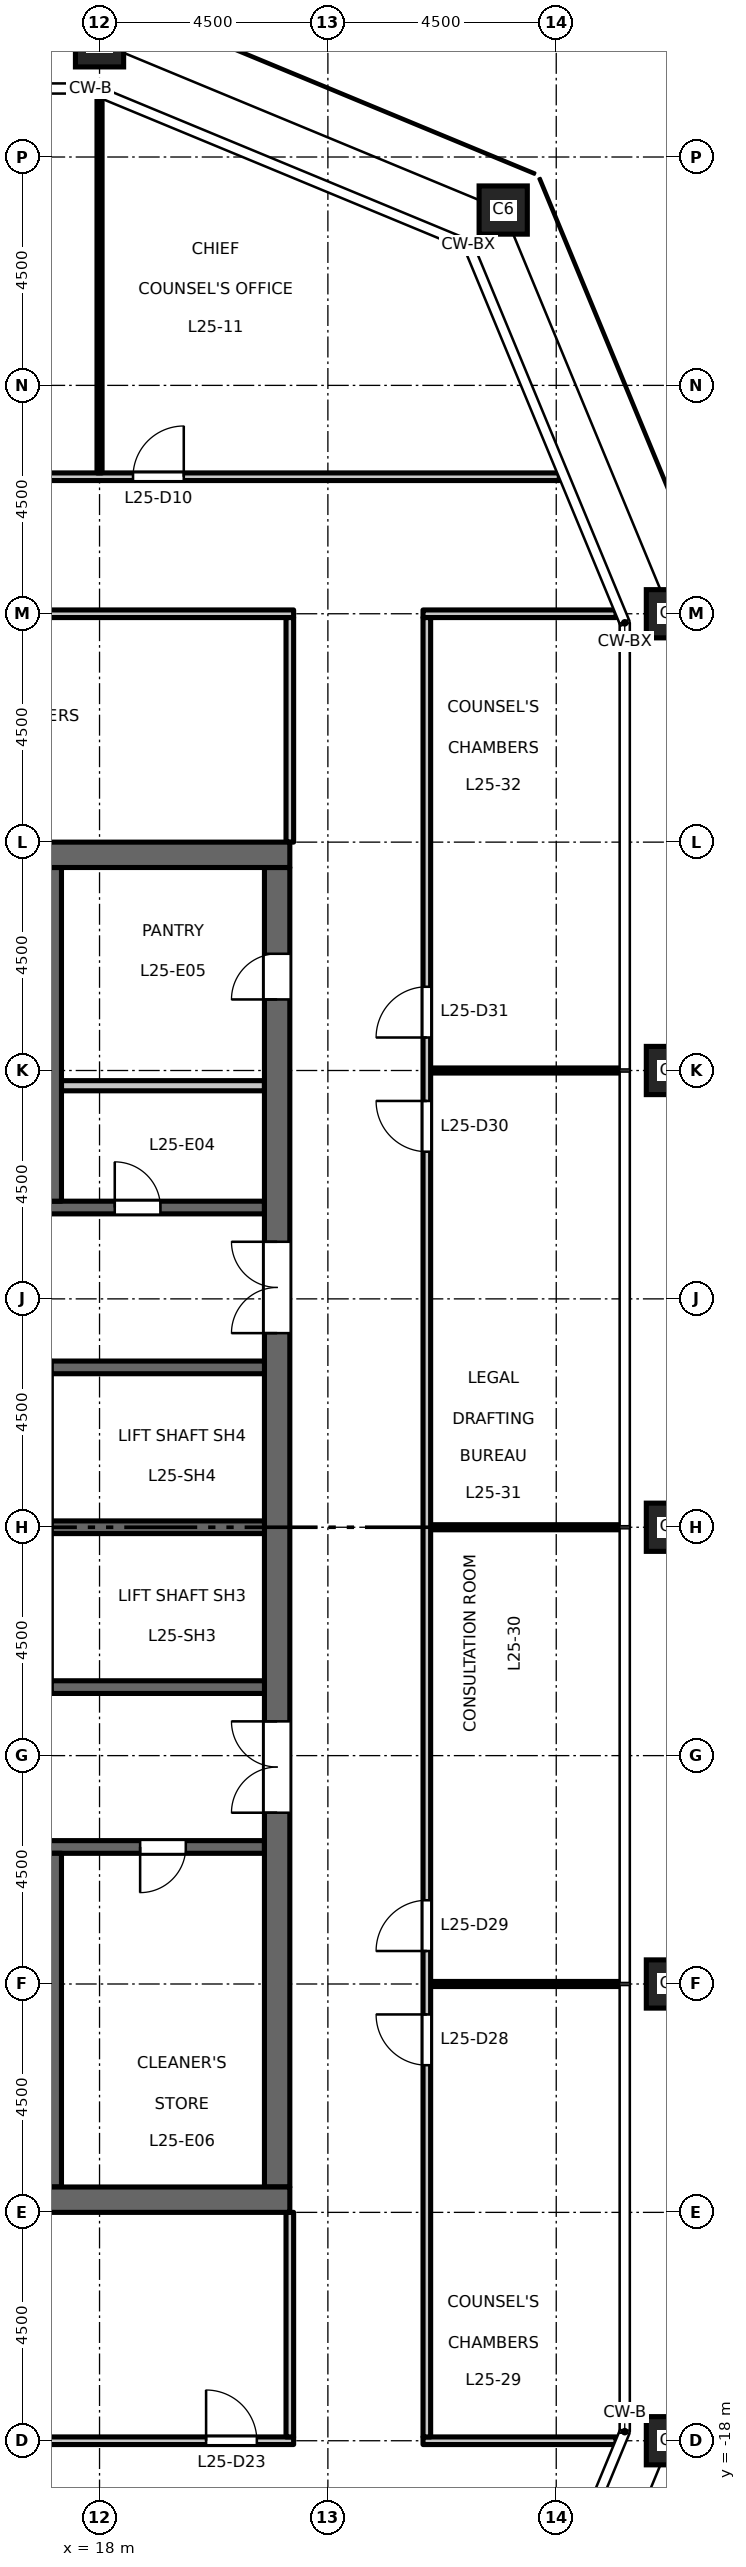
"""IFC4 building model, lengths in metres.
Left out: names, types, materials, properties, quantities, classifications, styles, units other than length and angle.
Written with IfcOpenShell. Run it as: python <this file> out.ifc"""

import sys

from ifc_helpers import new_model, si_unit, direction, frame, frame_2d, origin, origin_2d, place, context, subcontext, project, spatial, rectangle, hollow_rectangle, extrude, element, fill, save


model = new_model("IFC4")
c1 = context("Model", 3, precision=1e-05, world=origin(), true_north=direction((0.0, 1.0)))
c2 = subcontext(c1, "Body", "Model", "MODEL_VIEW")
j1 = project(units=[si_unit("LENGTHUNIT", "METRE"), si_unit("PLANEANGLEUNIT", "RADIAN")], contexts=[c1])
p1 = place(None, origin())
s1 = spatial("IfcSite", under=j1, at=p1, CompositionType="ELEMENT")
p2 = place(p1, origin())
s2 = spatial("IfcBuilding", under=s1, at=p2, CompositionType="ELEMENT")
p3 = place(p2, frame((0.0, 0.0, 118.2)))
s3 = spatial("IfcBuildingStorey", under=s2, at=p3, CompositionType="ELEMENT", Elevation=118.2)
for number, where, z_axis, x_axis in (
    (1, (29.25, -18.0, 0.0), (0.0, 0.0, 1.0), (1.0, 0.0, 0.0)),
    (2, (29.25, -9.0, 0.0), (0.0, 0.0, 1.0), (1.0, 0.0, 0.0)),
    (3, (29.25, 0.0, 0.0), (0.0, 0.0, 1.0), (1.0, 0.0, 0.0)),
    (4, (29.25, 9.0, 0.0), (0.0, 0.0, 1.0), (1.0, 0.0, 0.0)),
    (5, (29.25, 18.0, 0.0), (0.0, 0.0, 1.0), (1.0, 0.0, 0.0)),
    (6, (25.955, 25.955, 0.0), (0.0, 0.0, 1.0), (1.0, 0.0, 0.0)),
    (7, (18.0, 29.25, 0.0), (0.0, 0.0, 1.0), (1.0, 0.0, 0.0)),
):
    element("IfcColumn", number, at=place(p3, frame(where, z_axis=z_axis, x_axis=x_axis)), inside=s3, PredefinedType="COLUMN", context=c2, shape_type="SweptSolid", body=[
        extrude(hollow_rectangle(XDim=0.95, YDim=0.95, WallThickness=0.055, at=origin_2d()), origin(), (0.0, 0.0, 1.0), 4.5),
    ])
p4 = place(p3, frame((17.0, 6.3, 0.0), z_axis=(0.0, 0.0, 1.0), x_axis=(1.0, 0.0, 0.0)))
e8 = element("IfcWall", 8, at=p4, inside=s3, PredefinedType="SHEAR", context=c2, shape_type="SweptSolid", body=[
    extrude(rectangle(XDim=4.25, YDim=0.25, at=frame_2d((2.125, 0.0))), origin(), (0.0, 0.0, 1.0), 4.35),
])
p5 = place(p4, frame((1.3, 0.0, 0.0)))
e9 = element("IfcOpeningElement", 9, at=p5, cuts=e8, PredefinedType="OPENING", context=c2, shape_type="SweptSolid", body=[
    extrude(rectangle(XDim=0.9, YDim=2.1, at=frame_2d((0.45, 1.05))), frame((0.0, 0.135, 0.0), z_axis=(0.0, -1.0, 0.0), x_axis=(1.0, 0.0, 0.0)), (0.0, 0.0, 1.0), 0.27),
])
p6 = place(p3, frame((12.15, -6.3, 0.0), z_axis=(0.0, 0.0, 1.0), x_axis=(1.0, 0.0, 0.0)))
e10 = element("IfcWall", 10, at=p6, inside=s3, PredefinedType="SHEAR", context=c2, shape_type="SweptSolid", body=[
    extrude(rectangle(XDim=9.1, YDim=0.25, at=frame_2d((4.55, 0.0))), origin(), (0.0, 0.0, 1.0), 4.35),
])
p7 = place(p6, frame((1.8, 0.0, 0.0)))
e11 = element("IfcOpeningElement", 11, at=p7, cuts=e10, PredefinedType="OPENING", context=c2, shape_type="SweptSolid", body=[
    extrude(rectangle(XDim=1.0, YDim=2.1, at=frame_2d((0.5, 1.05))), frame((0.0, 0.135, 0.0), z_axis=(0.0, -1.0, 0.0), x_axis=(1.0, 0.0, 0.0)), (0.0, 0.0, 1.0), 0.27),
])
p8 = place(p6, frame((6.65, 0.0, 0.0)))
e12 = element("IfcOpeningElement", 12, at=p8, cuts=e10, PredefinedType="OPENING", context=c2, shape_type="SweptSolid", body=[
    extrude(rectangle(XDim=0.9, YDim=2.1, at=frame_2d((0.45, 1.05))), frame((0.0, 0.135, 0.0), z_axis=(0.0, -1.0, 0.0), x_axis=(1.0, 0.0, 0.0)), (0.0, 0.0, 1.0), 0.27),
])
p9 = place(p3, frame((21.5, -13.0, 0.0), z_axis=(0.0, 0.0, 1.0), x_axis=(0.0, 1.0, 0.0)))
e13 = element("IfcWall", 13, at=p9, inside=s3, PredefinedType="SHEAR", context=c2, shape_type="SweptSolid", body=[
    extrude(rectangle(XDim=26.0, YDim=0.5, at=frame_2d((13.0, 0.0))), origin(), (0.0, 0.0, 1.0), 4.35),
])
p10 = place(p9, frame((16.825, 0.0, 0.0)))
e14 = element("IfcOpeningElement", 14, at=p10, cuts=e13, PredefinedType="OPENING", context=c2, shape_type="SweptSolid", body=[
    extrude(rectangle(XDim=1.8, YDim=2.1, at=frame_2d((0.9, 1.05))), frame((0.0, 0.26, 0.0), z_axis=(0.0, -1.0, 0.0), x_axis=(1.0, 0.0, 0.0)), (0.0, 0.0, 1.0), 0.52),
])
p11 = place(p9, frame((7.375, 0.0, 0.0)))
e15 = element("IfcOpeningElement", 15, at=p11, cuts=e13, PredefinedType="OPENING", context=c2, shape_type="SweptSolid", body=[
    extrude(rectangle(XDim=1.8, YDim=2.1, at=frame_2d((0.9, 1.05))), frame((0.0, 0.26, 0.0), z_axis=(0.0, -1.0, 0.0), x_axis=(1.0, 0.0, 0.0)), (0.0, 0.0, 1.0), 0.52),
])
p12 = place(p9, frame((23.4, 0.0, 0.0)))
e16 = element("IfcOpeningElement", 16, at=p12, cuts=e13, PredefinedType="OPENING", context=c2, shape_type="SweptSolid", body=[
    extrude(rectangle(XDim=0.9, YDim=2.1, at=frame_2d((0.45, 1.05))), frame((0.0, 0.26, 0.0), z_axis=(0.0, -1.0, 0.0), x_axis=(1.0, 0.0, 0.0)), (0.0, 0.0, 1.0), 0.52),
])
p13 = place(p3, frame((17.25, 8.7, 0.0), z_axis=(0.0, 0.0, 1.0), x_axis=(1.0, 0.0, 0.0)))
e17 = element("IfcWall", 17, at=p13, inside=s3, PredefinedType="PARTITIONING", context=c2, shape_type="SweptSolid", body=[
    extrude(rectangle(XDim=4.0, YDim=0.2, at=frame_2d((2.0, 0.0))), origin(), (0.0, 0.0, 1.0), 4.35),
])
for number, where, z_axis, x_axis in (
    (18, (17.05, 0.0, 0.0), (0.0, 0.0, 1.0), (1.0, 0.0, 0.0)),
    (19, (17.05, 3.15, 0.0), (0.0, 0.0, 1.0), (1.0, 0.0, 0.0)),
    (20, (17.05, -3.15, 0.0), (0.0, 0.0, 1.0), (1.0, 0.0, 0.0)),
):
    element("IfcWall", number, at=place(p3, frame(where, z_axis=z_axis, x_axis=x_axis)), inside=s3, PredefinedType="SHEAR", context=c2, shape_type="SweptSolid", body=[
        extrude(rectangle(XDim=4.2, YDim=0.25, at=frame_2d((2.1, 0.0))), origin(), (0.0, 0.0, 1.0), 4.35),
    ])
for number, where, z_axis, x_axis in (
    (21, (17.0, 6.425, 0.0), (0.0, 0.0, 1.0), (0.0, 1.0, 0.0)),
    (22, (17.0, -13.0, 0.0), (0.0, 0.0, 1.0), (0.0, 1.0, 0.0)),
):
    element("IfcWall", number, at=place(p3, frame(where, z_axis=z_axis, x_axis=x_axis)), inside=s3, PredefinedType="SHEAR", context=c2, shape_type="SweptSolid", body=[
        extrude(rectangle(XDim=6.575, YDim=0.5, at=frame_2d((3.288, 0.0))), origin(), (0.0, 0.0, 1.0), 4.35),
    ])
for number, where, z_axis, x_axis in (
    (23, (8.25, 13.25, 0.0), (0.0, 0.0, 1.0), (1.0, 0.0, 0.0)),
    (24, (8.25, -13.25, 0.0), (0.0, 0.0, 1.0), (1.0, 0.0, 0.0)),
):
    element("IfcWall", number, at=place(p3, frame(where, z_axis=z_axis, x_axis=x_axis)), inside=s3, PredefinedType="SHEAR", context=c2, shape_type="SweptSolid", body=[
        extrude(rectangle(XDim=13.5, YDim=0.5, at=frame_2d((6.75, 0.0))), origin(), (0.0, 0.0, 1.0), 4.35),
    ])
p14 = place(p3, frame((-21.825, -18.0, 0.0), z_axis=(0.0, 0.0, 1.0), x_axis=(1.0, 0.0, 0.0)))
e25 = element("IfcWall", 25, at=p14, inside=s3, PredefinedType="PARTITIONING", context=c2, shape_type="SweptSolid", body=[
    extrude(rectangle(XDim=43.65, YDim=0.15, at=frame_2d((21.825, 0.0))), origin(), (0.0, 0.0, 1.0), 4.35),
])
p15 = place(p14, frame((14.175, 0.0, 0.0)))
e26 = element("IfcOpeningElement", 26, at=p15, cuts=e25, PredefinedType="OPENING", context=c2, shape_type="SweptSolid", body=[
    extrude(rectangle(XDim=1.0, YDim=2.1, at=frame_2d((0.5, 1.05))), frame((0.0, 0.085, 0.0), z_axis=(0.0, -1.0, 0.0), x_axis=(1.0, 0.0, 0.0)), (0.0, 0.0, 1.0), 0.17),
])
p16 = place(p14, frame((28.425, 0.0, 0.0)))
e27 = element("IfcOpeningElement", 27, at=p16, cuts=e25, PredefinedType="OPENING", context=c2, shape_type="SweptSolid", body=[
    extrude(rectangle(XDim=1.0, YDim=2.1, at=frame_2d((0.5, 1.05))), frame((0.0, 0.085, 0.0), z_axis=(0.0, -1.0, 0.0), x_axis=(1.0, 0.0, 0.0)), (0.0, 0.0, 1.0), 0.17),
])
p17 = place(p14, frame((0.675, 0.0, 0.0)))
e28 = element("IfcOpeningElement", 28, at=p17, cuts=e25, PredefinedType="OPENING", context=c2, shape_type="SweptSolid", body=[
    extrude(rectangle(XDim=1.0, YDim=2.1, at=frame_2d((0.5, 1.05))), frame((0.0, 0.085, 0.0), z_axis=(0.0, -1.0, 0.0), x_axis=(1.0, 0.0, 0.0)), (0.0, 0.0, 1.0), 0.17),
])
p18 = place(p14, frame((41.925, 0.0, 0.0)))
e29 = element("IfcOpeningElement", 29, at=p18, cuts=e25, PredefinedType="OPENING", context=c2, shape_type="SweptSolid", body=[
    extrude(rectangle(XDim=1.0, YDim=2.1, at=frame_2d((0.5, 1.05))), frame((0.0, 0.085, 0.0), z_axis=(0.0, -1.0, 0.0), x_axis=(1.0, 0.0, 0.0)), (0.0, 0.0, 1.0), 0.17),
])
p19 = place(p3, frame((24.375, -18.0, 0.0), z_axis=(0.0, 0.0, 1.0), x_axis=(1.0, 0.0, 0.0)))
e30 = element("IfcWall", 30, at=p19, inside=s3, PredefinedType="PARTITIONING", context=c2, shape_type="SweptSolid", body=[
    extrude(rectangle(XDim=3.803, YDim=0.15, at=frame_2d((1.901, 0.0))), origin(), (0.0, 0.0, 1.0), 4.35),
])
for number, where, z_axis, x_axis in (
    (31, (24.525, -9.0, 0.0), (0.0, 0.0, 1.0), (1.0, 0.0, 0.0)),
    (32, (24.525, 0.0, 0.0), (0.0, 0.0, 1.0), (1.0, 0.0, 0.0)),
    (33, (24.525, 9.0, 0.0), (0.0, 0.0, 1.0), (1.0, 0.0, 0.0)),
):
    element("IfcWall", number, at=place(p3, frame(where, z_axis=z_axis, x_axis=x_axis)), inside=s3, PredefinedType="PARTITIONING", context=c2, shape_type="SweptSolid", body=[
        extrude(rectangle(XDim=3.735, YDim=0.1, at=frame_2d((1.868, 0.0))), origin(), (0.0, 0.0, 1.0), 4.35),
    ])
p20 = place(p3, frame((-21.825, 18.0, 0.0), z_axis=(0.0, 0.0, 1.0), x_axis=(1.0, 0.0, 0.0)))
e34 = element("IfcWall", 34, at=p20, inside=s3, PredefinedType="PARTITIONING", context=c2, shape_type="SweptSolid", body=[
    extrude(rectangle(XDim=43.65, YDim=0.15, at=frame_2d((21.825, 0.0))), origin(), (0.0, 0.0, 1.0), 4.35),
])
p21 = place(p20, frame((14.225, 0.0, 0.0)))
e35 = element("IfcOpeningElement", 35, at=p21, cuts=e34, PredefinedType="OPENING", context=c2, shape_type="SweptSolid", body=[
    extrude(rectangle(XDim=1.0, YDim=2.1, at=frame_2d((0.5, 1.05))), frame((0.0, 0.085, 0.0), z_axis=(0.0, -1.0, 0.0), x_axis=(1.0, 0.0, 0.0)), (0.0, 0.0, 1.0), 0.17),
])
p22 = place(p20, frame((11.975, 0.0, 0.0)))
e36 = element("IfcOpeningElement", 36, at=p22, cuts=e34, PredefinedType="OPENING", context=c2, shape_type="SweptSolid", body=[
    extrude(rectangle(XDim=1.0, YDim=2.1, at=frame_2d((0.5, 1.05))), frame((0.0, 0.085, 0.0), z_axis=(0.0, -1.0, 0.0), x_axis=(1.0, 0.0, 0.0)), (0.0, 0.0, 1.0), 0.17),
])
p23 = place(p20, frame((30.725, 0.0, 0.0)))
e37 = element("IfcOpeningElement", 37, at=p23, cuts=e34, PredefinedType="OPENING", context=c2, shape_type="SweptSolid", body=[
    extrude(rectangle(XDim=1.0, YDim=2.1, at=frame_2d((0.5, 1.05))), frame((0.0, 0.085, 0.0), z_axis=(0.0, -1.0, 0.0), x_axis=(1.0, 0.0, 0.0)), (0.0, 0.0, 1.0), 0.17),
])
p24 = place(p3, frame((24.375, 18.0, 0.0), z_axis=(0.0, 0.0, 1.0), x_axis=(1.0, 0.0, 0.0)))
e38 = element("IfcWall", 38, at=p24, inside=s3, PredefinedType="PARTITIONING", context=c2, shape_type="SweptSolid", body=[
    extrude(rectangle(XDim=3.803, YDim=0.15, at=frame_2d((1.901, 0.0))), origin(), (0.0, 0.0, 1.0), 4.35),
])
p25 = place(p3, frame((-27.06, 20.7, 0.0), z_axis=(0.0, 0.0, 1.0), x_axis=(1.0, 0.0, 0.0)))
e39 = element("IfcWall", 39, at=p25, inside=s3, PredefinedType="PARTITIONING", context=c2, shape_type="SweptSolid", body=[
    extrude(rectangle(XDim=54.12, YDim=0.15, at=frame_2d((27.06, 0.0))), origin(), (0.0, 0.0, 1.0), 4.35),
])
p26 = place(p25, frame((16.41, 0.0, 0.0)))
e40 = element("IfcOpeningElement", 40, at=p26, cuts=e39, PredefinedType="OPENING", context=c2, shape_type="SweptSolid", body=[
    extrude(rectangle(XDim=1.0, YDim=2.1, at=frame_2d((0.5, 1.05))), frame((0.0, 0.085, 0.0), z_axis=(0.0, -1.0, 0.0), x_axis=(1.0, 0.0, 0.0)), (0.0, 0.0, 1.0), 0.17),
])
p27 = place(p25, frame((18.66, 0.0, 0.0)))
e41 = element("IfcOpeningElement", 41, at=p27, cuts=e39, PredefinedType="OPENING", context=c2, shape_type="SweptSolid", body=[
    extrude(rectangle(XDim=1.0, YDim=2.1, at=frame_2d((0.5, 1.05))), frame((0.0, 0.085, 0.0), z_axis=(0.0, -1.0, 0.0), x_axis=(1.0, 0.0, 0.0)), (0.0, 0.0, 1.0), 0.17),
])
p28 = place(p25, frame((34.41, 0.0, 0.0)))
e42 = element("IfcOpeningElement", 42, at=p28, cuts=e39, PredefinedType="OPENING", context=c2, shape_type="SweptSolid", body=[
    extrude(rectangle(XDim=1.0, YDim=2.1, at=frame_2d((0.5, 1.05))), frame((0.0, 0.085, 0.0), z_axis=(0.0, -1.0, 0.0), x_axis=(1.0, 0.0, 0.0)), (0.0, 0.0, 1.0), 0.17),
])
p29 = place(p25, frame((36.66, 0.0, 0.0)))
e43 = element("IfcOpeningElement", 43, at=p29, cuts=e39, PredefinedType="OPENING", context=c2, shape_type="SweptSolid", body=[
    extrude(rectangle(XDim=1.0, YDim=2.1, at=frame_2d((0.5, 1.05))), frame((0.0, 0.085, 0.0), z_axis=(0.0, -1.0, 0.0), x_axis=(1.0, 0.0, 0.0)), (0.0, 0.0, 1.0), 0.17),
])
p30 = place(p25, frame((7.41, 0.0, 0.0)))
e44 = element("IfcOpeningElement", 44, at=p30, cuts=e39, PredefinedType="OPENING", context=c2, shape_type="SweptSolid", body=[
    extrude(rectangle(XDim=1.0, YDim=2.1, at=frame_2d((0.5, 1.05))), frame((0.0, 0.085, 0.0), z_axis=(0.0, -1.0, 0.0), x_axis=(1.0, 0.0, 0.0)), (0.0, 0.0, 1.0), 0.17),
])
p31 = place(p25, frame((45.72, 0.0, 0.0)))
e45 = element("IfcOpeningElement", 45, at=p31, cuts=e39, PredefinedType="OPENING", context=c2, shape_type="SweptSolid", body=[
    extrude(rectangle(XDim=1.0, YDim=2.1, at=frame_2d((0.5, 1.05))), frame((0.0, 0.085, 0.0), z_axis=(0.0, -1.0, 0.0), x_axis=(1.0, 0.0, 0.0)), (0.0, 0.0, 1.0), 0.17),
])
p32 = place(p3, frame((18.0, 20.775, 0.0), z_axis=(0.0, 0.0, 1.0), x_axis=(0.0, 1.0, 0.0)))
e46 = element("IfcWall", 46, at=p32, inside=s3, PredefinedType="PARTITIONING", context=c2, shape_type="SweptSolid", body=[
    extrude(rectangle(XDim=7.403, YDim=0.1, at=frame_2d((3.702, 0.0))), origin(), (0.0, 0.0, 1.0), 3.45),
])
for number, where, z_axis, x_axis in (
    (47, (21.75, -17.925, 0.0), (0.0, 0.0, 1.0), (0.0, 1.0, 0.0)),
    (48, (21.75, 13.5, 0.0), (0.0, 0.0, 1.0), (0.0, 1.0, 0.0)),
):
    element("IfcWall", number, at=place(p3, frame(where, z_axis=z_axis, x_axis=x_axis)), inside=s3, PredefinedType="PARTITIONING", context=c2, shape_type="SweptSolid", body=[
        extrude(rectangle(XDim=4.425, YDim=0.15, at=frame_2d((2.212, 0.0))), origin(), (0.0, 0.0, 1.0), 4.35),
    ])
p33 = place(p3, frame((24.45, -17.925, 0.0), z_axis=(0.0, 0.0, 1.0), x_axis=(0.0, 1.0, 0.0)))
e49 = element("IfcWall", 49, at=p33, inside=s3, PredefinedType="PARTITIONING", context=c2, shape_type="SweptSolid", body=[
    extrude(rectangle(XDim=35.85, YDim=0.15, at=frame_2d((17.925, 0.0))), origin(), (0.0, 0.0, 1.0), 4.35),
])
p34 = place(p33, frame((7.325, 0.0, 0.0)))
e50 = element("IfcOpeningElement", 50, at=p34, cuts=e49, PredefinedType="OPENING", context=c2, shape_type="SweptSolid", body=[
    extrude(rectangle(XDim=1.0, YDim=2.1, at=frame_2d((0.5, 1.05))), frame((0.0, 0.085, 0.0), z_axis=(0.0, -1.0, 0.0), x_axis=(1.0, 0.0, 0.0)), (0.0, 0.0, 1.0), 0.17),
])
p35 = place(p33, frame((9.575, 0.0, 0.0)))
e51 = element("IfcOpeningElement", 51, at=p35, cuts=e49, PredefinedType="OPENING", context=c2, shape_type="SweptSolid", body=[
    extrude(rectangle(XDim=1.0, YDim=2.1, at=frame_2d((0.5, 1.05))), frame((0.0, 0.085, 0.0), z_axis=(0.0, -1.0, 0.0), x_axis=(1.0, 0.0, 0.0)), (0.0, 0.0, 1.0), 0.17),
])
p36 = place(p33, frame((25.325, 0.0, 0.0)))
e52 = element("IfcOpeningElement", 52, at=p36, cuts=e49, PredefinedType="OPENING", context=c2, shape_type="SweptSolid", body=[
    extrude(rectangle(XDim=1.0, YDim=2.1, at=frame_2d((0.5, 1.05))), frame((0.0, 0.085, 0.0), z_axis=(0.0, -1.0, 0.0), x_axis=(1.0, 0.0, 0.0)), (0.0, 0.0, 1.0), 0.17),
])
p37 = place(p33, frame((27.575, 0.0, 0.0)))
e53 = element("IfcOpeningElement", 53, at=p37, cuts=e49, PredefinedType="OPENING", context=c2, shape_type="SweptSolid", body=[
    extrude(rectangle(XDim=1.0, YDim=2.1, at=frame_2d((0.5, 1.05))), frame((0.0, 0.085, 0.0), z_axis=(0.0, -1.0, 0.0), x_axis=(1.0, 0.0, 0.0)), (0.0, 0.0, 1.0), 0.17),
])
p38 = place(p10, origin())
e54 = element("IfcDoor", 54, at=p38, inside=s3, OperationType="DOUBLE_DOOR_DOUBLE_SWING", PredefinedType="DOOR", context=c2, shape_type="SweptSolid", body=[
    extrude(rectangle(XDim=1.8, YDim=2.1, at=frame_2d((0.9, 1.05))), frame((0.0, 0.025, 0.0), z_axis=(0.0, -1.0, 0.0), x_axis=(1.0, 0.0, 0.0)), (0.0, 0.0, 1.0), 0.05),
])
fill(e14, e54)
p39 = place(p11, origin())
e55 = element("IfcDoor", 55, at=p39, inside=s3, OperationType="DOUBLE_DOOR_DOUBLE_SWING", PredefinedType="DOOR", context=c2, shape_type="SweptSolid", body=[
    extrude(rectangle(XDim=1.8, YDim=2.1, at=frame_2d((0.9, 1.05))), frame((0.0, 0.025, 0.0), z_axis=(0.0, -1.0, 0.0), x_axis=(1.0, 0.0, 0.0)), (0.0, 0.0, 1.0), 0.05),
])
fill(e15, e55)
p40 = place(p5, origin())
e56 = element("IfcDoor", 56, at=p40, inside=s3, OperationType="SINGLE_SWING_RIGHT", PredefinedType="DOOR", context=c2, shape_type="SweptSolid", body=[
    extrude(rectangle(XDim=0.9, YDim=2.1, at=frame_2d((0.45, 1.05))), frame((0.0, 0.025, 0.0), z_axis=(0.0, -1.0, 0.0), x_axis=(1.0, 0.0, 0.0)), (0.0, 0.0, 1.0), 0.05),
])
fill(e9, e56)
p41 = place(p12, origin())
e57 = element("IfcDoor", 57, at=p41, inside=s3, OperationType="SINGLE_SWING_RIGHT", PredefinedType="DOOR", context=c2, shape_type="SweptSolid", body=[
    extrude(rectangle(XDim=0.9, YDim=2.1, at=frame_2d((0.45, 1.05))), frame((0.0, 0.025, 0.0), z_axis=(0.0, -1.0, 0.0), x_axis=(1.0, 0.0, 0.0)), (0.0, 0.0, 1.0), 0.05),
])
fill(e16, e57)
p42 = place(p8, origin())
e58 = element("IfcDoor", 58, at=p42, inside=s3, OperationType="SINGLE_SWING_LEFT", PredefinedType="DOOR", context=c2, shape_type="SweptSolid", body=[
    extrude(rectangle(XDim=0.9, YDim=2.1, at=frame_2d((0.45, 1.05))), frame((0.0, 0.025, 0.0), z_axis=(0.0, -1.0, 0.0), x_axis=(1.0, 0.0, 0.0)), (0.0, 0.0, 1.0), 0.05),
])
fill(e12, e58)
p43 = place(p31, origin())
e59 = element("IfcDoor", 59, at=p43, inside=s3, OperationType="SINGLE_SWING_RIGHT", PredefinedType="DOOR", context=c2, shape_type="SweptSolid", body=[
    extrude(rectangle(XDim=1.0, YDim=2.1, at=frame_2d((0.5, 1.05))), frame((0.0, 0.025, 0.0), z_axis=(0.0, -1.0, 0.0), x_axis=(1.0, 0.0, 0.0)), (0.0, 0.0, 1.0), 0.05),
])
fill(e45, e59)
p44 = place(p18, origin())
e60 = element("IfcDoor", 60, at=p44, inside=s3, OperationType="SINGLE_SWING_LEFT", PredefinedType="DOOR", context=c2, shape_type="SweptSolid", body=[
    extrude(rectangle(XDim=1.0, YDim=2.1, at=frame_2d((0.5, 1.05))), frame((0.0, 0.025, 0.0), z_axis=(0.0, -1.0, 0.0), x_axis=(1.0, 0.0, 0.0)), (0.0, 0.0, 1.0), 0.05),
])
fill(e29, e60)
p45 = place(p34, origin())
e61 = element("IfcDoor", 61, at=p45, inside=s3, OperationType="SINGLE_SWING_RIGHT", PredefinedType="DOOR", context=c2, shape_type="SweptSolid", body=[
    extrude(rectangle(XDim=1.0, YDim=2.1, at=frame_2d((0.5, 1.05))), frame((0.0, 0.025, 0.0), z_axis=(0.0, -1.0, 0.0), x_axis=(1.0, 0.0, 0.0)), (0.0, 0.0, 1.0), 0.05),
])
fill(e50, e61)
p46 = place(p35, origin())
e62 = element("IfcDoor", 62, at=p46, inside=s3, OperationType="SINGLE_SWING_LEFT", PredefinedType="DOOR", context=c2, shape_type="SweptSolid", body=[
    extrude(rectangle(XDim=1.0, YDim=2.1, at=frame_2d((0.5, 1.05))), frame((0.0, 0.025, 0.0), z_axis=(0.0, -1.0, 0.0), x_axis=(1.0, 0.0, 0.0)), (0.0, 0.0, 1.0), 0.05),
])
fill(e51, e62)
p47 = place(p36, origin())
e63 = element("IfcDoor", 63, at=p47, inside=s3, OperationType="SINGLE_SWING_RIGHT", PredefinedType="DOOR", context=c2, shape_type="SweptSolid", body=[
    extrude(rectangle(XDim=1.0, YDim=2.1, at=frame_2d((0.5, 1.05))), frame((0.0, 0.025, 0.0), z_axis=(0.0, -1.0, 0.0), x_axis=(1.0, 0.0, 0.0)), (0.0, 0.0, 1.0), 0.05),
])
fill(e52, e63)
p48 = place(p37, origin())
e64 = element("IfcDoor", 64, at=p48, inside=s3, OperationType="SINGLE_SWING_LEFT", PredefinedType="DOOR", context=c2, shape_type="SweptSolid", body=[
    extrude(rectangle(XDim=1.0, YDim=2.1, at=frame_2d((0.5, 1.05))), frame((0.0, 0.025, 0.0), z_axis=(0.0, -1.0, 0.0), x_axis=(1.0, 0.0, 0.0)), (0.0, 0.0, 1.0), 0.05),
])
fill(e53, e64)
save(model, sys.argv[1])
